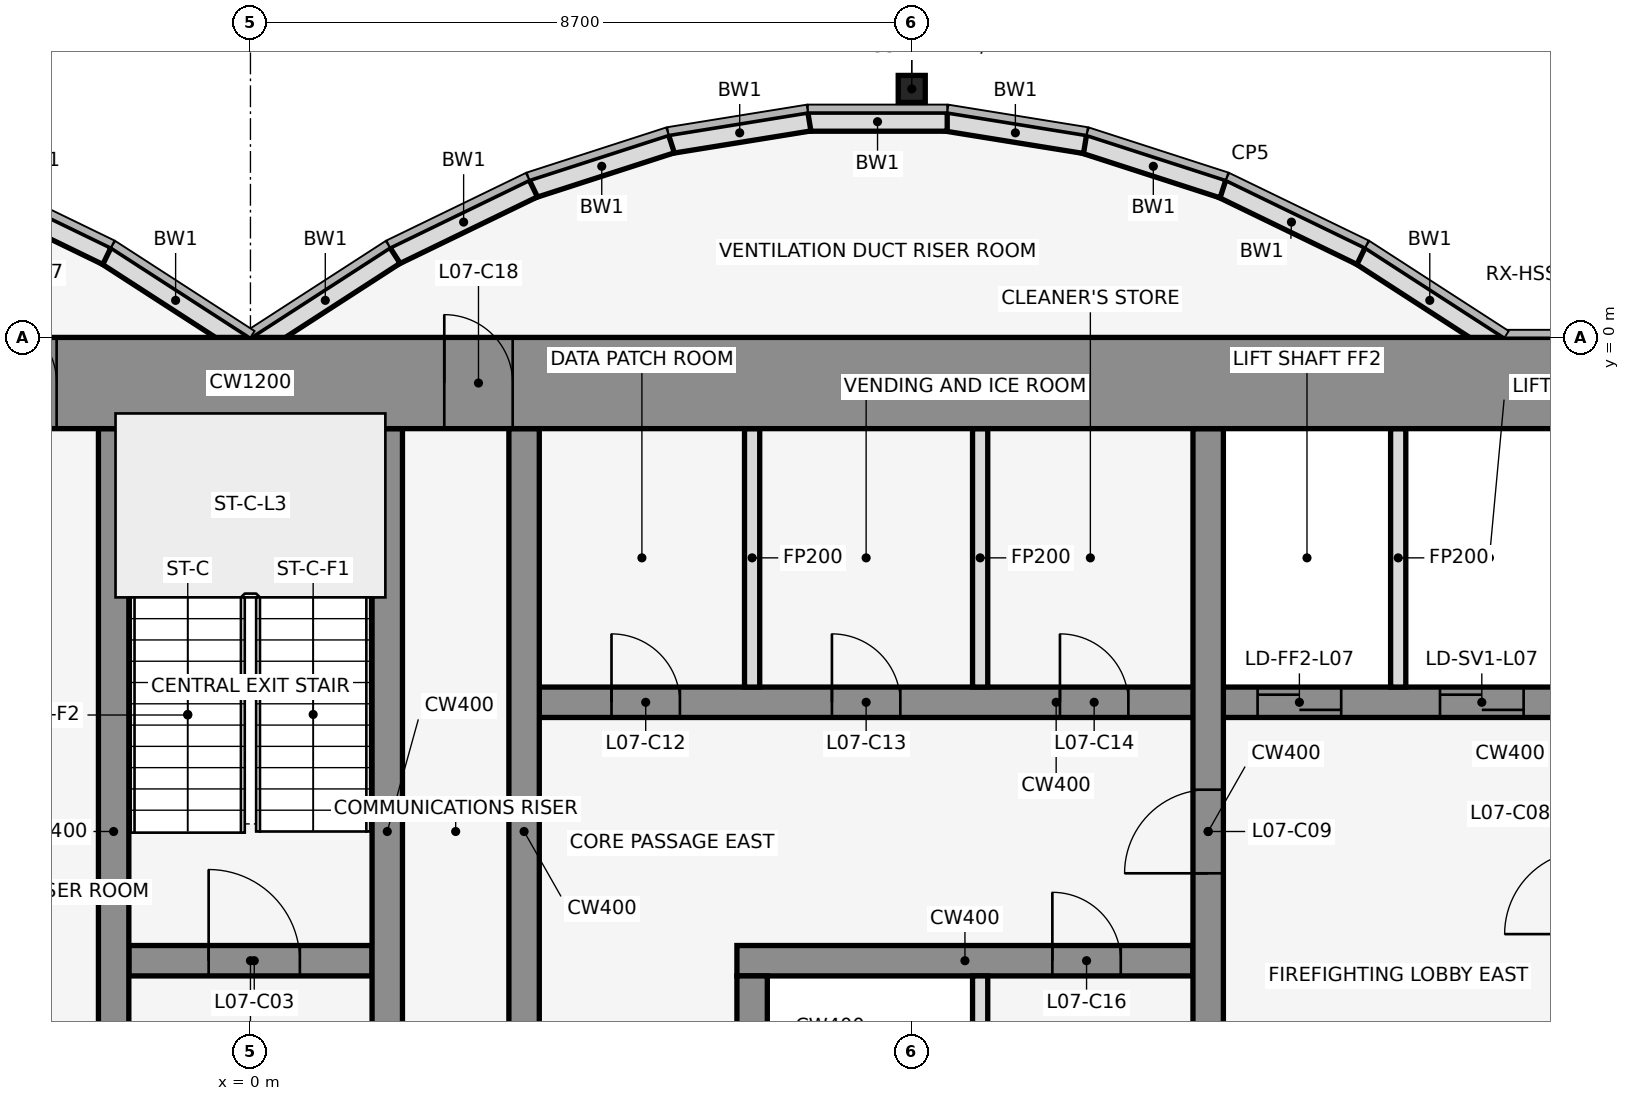
"""IFC4 building model, lengths in metres.
Left out: names, types, materials, properties, quantities, classifications, styles, units other than length and angle.
Written with IfcOpenShell. Run it as: python <this file> out.ifc"""

import sys

from ifc_helpers import new_model, si_unit, direction, frame, frame_2d, origin, origin_2d, place, context, subcontext, project, spatial, rectangle, hollow_rectangle, extrude, element, fill, save


model = new_model("IFC4")
c1 = context("Model", 3, precision=1e-05, world=origin(), true_north=direction((0.0, 1.0)))
c2 = subcontext(c1, "Body", "Model", "MODEL_VIEW")
j1 = project(units=[si_unit("LENGTHUNIT", "METRE"), si_unit("PLANEANGLEUNIT", "RADIAN")], contexts=[c1])
p1 = place(None, origin())
s1 = spatial("IfcSite", under=j1, at=p1, CompositionType="ELEMENT")
p2 = place(p1, origin())
s2 = spatial("IfcBuilding", under=s1, at=p2, CompositionType="ELEMENT")
p3 = place(p2, frame((0.0, 0.0, 39.5)))
s3 = spatial("IfcBuildingStorey", under=s2, at=p3, CompositionType="ELEMENT", Elevation=39.5)
p4 = place(p3, frame((8.7, 3.269, 0.0), z_axis=(0.0, 0.0, 1.0), x_axis=(1.0, 0.0, 0.0)))
e1 = element("IfcColumn", 1, at=p4, inside=s3, PredefinedType="COLUMN", context=c2, shape_type="SweptSolid", body=[
    extrude(hollow_rectangle(XDim=0.356, YDim=0.356, WallThickness=0.012, at=origin_2d()), origin(), (0.0, 0.0, 1.0), 4.5),
])
p5 = place(p3, frame((16.432, -0.105, 0.0), z_axis=(0.0, 0.0, 1.0), x_axis=(-0.83981312244, 0.542875602121, 0.0)))
e2 = element("IfcWall", 2, at=p5, inside=s3, PredefinedType="STANDARD", context=c2, shape_type="SweptSolid", body=[
    extrude(rectangle(XDim=2.183, YDim=0.25, at=frame_2d((1.091, 0.0))), origin(), (0.0, 0.0, 1.0), 4.35),
])
p6 = place(p3, frame((14.612, 1.073, 0.0), z_axis=(0.0, 0.0, 1.0), x_axis=(-0.89982408427, 0.436252928206, 0.0)))
e3 = element("IfcWall", 3, at=p6, inside=s3, PredefinedType="STANDARD", context=c2, shape_type="SweptSolid", body=[
    extrude(rectangle(XDim=2.038, YDim=0.25, at=frame_2d((1.019, 0.0))), origin(), (0.0, 0.0, 1.0), 4.35),
])
p7 = place(p3, frame((12.795, 1.955, 0.0), z_axis=(0.0, 0.0, 1.0), x_axis=(-0.951495806175, 0.307661714928, 0.0)))
e4 = element("IfcWall", 4, at=p7, inside=s3, PredefinedType="STANDARD", context=c2, shape_type="SweptSolid", body=[
    extrude(rectangle(XDim=1.927, YDim=0.25, at=frame_2d((0.963, 0.0))), origin(), (0.0, 0.0, 1.0), 4.35),
])
p8 = place(p3, frame((10.98, 2.543, 0.0), z_axis=(0.0, 0.0, 1.0), x_axis=(-0.987181718931, 0.159600293885, 0.0)))
e5 = element("IfcWall", 5, at=p8, inside=s3, PredefinedType="STANDARD", context=c2, shape_type="SweptSolid", body=[
    extrude(rectangle(XDim=1.857, YDim=0.25, at=frame_2d((0.929, 0.0))), origin(), (0.0, 0.0, 1.0), 4.35),
])
p9 = place(p3, frame((9.167, 2.838, 0.0), z_axis=(0.0, 0.0, 1.0), x_axis=(-1.0, 0.0, 0.0)))
e6 = element("IfcWall", 6, at=p9, inside=s3, PredefinedType="STANDARD", context=c2, shape_type="SweptSolid", body=[
    extrude(rectangle(XDim=1.833, YDim=0.25, at=frame_2d((0.917, 0.0))), origin(), (0.0, 0.0, 1.0), 4.35),
])
p10 = place(p3, frame((7.353, 2.84, 0.0), z_axis=(0.0, 0.0, 1.0), x_axis=(-0.987181718931, -0.159600293885, 0.0)))
e7 = element("IfcWall", 7, at=p10, inside=s3, PredefinedType="STANDARD", context=c2, shape_type="SweptSolid", body=[
    extrude(rectangle(XDim=1.857, YDim=0.25, at=frame_2d((0.929, 0.0))), origin(), (0.0, 0.0, 1.0), 4.35),
])
p11 = place(p3, frame((5.538, 2.548, 0.0), z_axis=(0.0, 0.0, 1.0), x_axis=(-0.951495806175, -0.307661714928, 0.0)))
e8 = element("IfcWall", 8, at=p11, inside=s3, PredefinedType="STANDARD", context=c2, shape_type="SweptSolid", body=[
    extrude(rectangle(XDim=1.927, YDim=0.25, at=frame_2d((0.963, 0.0))), origin(), (0.0, 0.0, 1.0), 4.35),
])
p12 = place(p3, frame((3.721, 1.962, 0.0), z_axis=(0.0, 0.0, 1.0), x_axis=(-0.89982408427, -0.436252928206, 0.0)))
e9 = element("IfcWall", 9, at=p12, inside=s3, PredefinedType="STANDARD", context=c2, shape_type="SweptSolid", body=[
    extrude(rectangle(XDim=2.038, YDim=0.25, at=frame_2d((1.019, 0.0))), origin(), (0.0, 0.0, 1.0), 4.35),
])
for number, where, z_axis, x_axis in (
    (10, (1.901, 1.08, 0.0), (0.0, 0.0, 1.0), (-0.84, -0.543, 0.0)),
    (11, (-0.068, -0.105, 0.0), (0.0, 0.0, 1.0), (-0.84, 0.543, 0.0)),
):
    element("IfcWall", number, at=place(p3, frame(where, z_axis=z_axis, x_axis=x_axis)), inside=s3, PredefinedType="STANDARD", context=c2, shape_type="SweptSolid", body=[
        extrude(rectangle(XDim=2.183, YDim=0.25, at=frame_2d((1.091, 0.0))), origin(), (0.0, 0.0, 1.0), 4.35),
    ])
p13 = place(p3, frame((-1.888, 1.073, 0.0), z_axis=(0.0, 0.0, 1.0), x_axis=(-0.89982408427, 0.436252928206, 0.0)))
e12 = element("IfcWall", 12, at=p13, inside=s3, PredefinedType="STANDARD", context=c2, shape_type="SweptSolid", body=[
    extrude(rectangle(XDim=2.038, YDim=0.25, at=frame_2d((1.019, 0.0))), origin(), (0.0, 0.0, 1.0), 4.35),
])
p14 = place(p3, frame((-1.6, -8.2, 0.0), z_axis=(0.0, 0.0, 1.0), x_axis=(1.0, 0.0, 0.0)))
e13 = element("IfcWall", 13, at=p14, inside=s3, PredefinedType="SHEAR", context=c2, shape_type="SweptSolid", body=[
    extrude(rectangle(XDim=3.2, YDim=0.4, at=frame_2d((1.6, 0.0))), origin(), (0.0, 0.0, 1.0), 4.5),
])
p15 = place(p14, frame((1.05, 0.0, 0.0)))
e14 = element("IfcOpeningElement", 14, at=p15, cuts=e13, PredefinedType="OPENING", context=c2, shape_type="SweptSolid", body=[
    extrude(rectangle(XDim=1.2, YDim=2.1, at=frame_2d((0.6, 1.05))), frame((0.0, 0.212, 0.0), z_axis=(0.0, -1.0, 0.0), x_axis=(1.0, 0.0, 0.0)), (0.0, 0.0, 1.0), 0.424),
])
p16 = place(p3, frame((6.4, -8.2, 0.0), z_axis=(0.0, 0.0, 1.0), x_axis=(1.0, 0.0, 0.0)))
e15 = element("IfcWall", 15, at=p16, inside=s3, PredefinedType="SHEAR", context=c2, shape_type="SweptSolid", body=[
    extrude(rectangle(XDim=6.0, YDim=0.4, at=frame_2d((3.0, 0.0))), origin(), (0.0, 0.0, 1.0), 4.5),
])
p17 = place(p16, frame((4.15, 0.0, 0.0)))
e16 = element("IfcOpeningElement", 16, at=p17, cuts=e15, PredefinedType="OPENING", context=c2, shape_type="SweptSolid", body=[
    extrude(rectangle(XDim=0.9, YDim=2.1, at=frame_2d((0.45, 1.05))), frame((0.0, 0.212, 0.0), z_axis=(0.0, -1.0, 0.0), x_axis=(1.0, 0.0, 0.0)), (0.0, 0.0, 1.0), 0.424),
])
p18 = place(p3, frame((3.8, -4.8, 0.0), z_axis=(0.0, 0.0, 1.0), x_axis=(1.0, 0.0, 0.0)))
e17 = element("IfcWall", 17, at=p18, inside=s3, PredefinedType="SHEAR", context=c2, shape_type="SweptSolid", body=[
    extrude(rectangle(XDim=13.6, YDim=0.4, at=frame_2d((6.8, 0.0))), origin(), (0.0, 0.0, 1.0), 4.5),
])
p19 = place(p18, frame((9.45, 0.0, 0.0)))
e18 = element("IfcOpeningElement", 18, at=p19, cuts=e17, PredefinedType="OPENING", context=c2, shape_type="SweptSolid", body=[
    extrude(rectangle(XDim=1.1, YDim=2.1, at=frame_2d((0.55, 1.05))), frame((0.0, 0.212, 0.0), z_axis=(0.0, -1.0, 0.0), x_axis=(1.0, 0.0, 0.0)), (0.0, 0.0, 1.0), 0.424),
])
p20 = place(p18, frame((11.85, 0.0, 0.0)))
e19 = element("IfcOpeningElement", 19, at=p20, cuts=e17, PredefinedType="OPENING", context=c2, shape_type="SweptSolid", body=[
    extrude(rectangle(XDim=1.1, YDim=2.1, at=frame_2d((0.55, 1.05))), frame((0.0, 0.212, 0.0), z_axis=(0.0, -1.0, 0.0), x_axis=(1.0, 0.0, 0.0)), (0.0, 0.0, 1.0), 0.424),
])
p21 = place(p18, frame((0.95, 0.0, 0.0)))
e20 = element("IfcOpeningElement", 20, at=p21, cuts=e17, PredefinedType="OPENING", context=c2, shape_type="SweptSolid", body=[
    extrude(rectangle(XDim=0.9, YDim=2.1, at=frame_2d((0.45, 1.05))), frame((0.0, 0.212, 0.0), z_axis=(0.0, -1.0, 0.0), x_axis=(1.0, 0.0, 0.0)), (0.0, 0.0, 1.0), 0.424),
])
p22 = place(p18, frame((3.85, 0.0, 0.0)))
e21 = element("IfcOpeningElement", 21, at=p22, cuts=e17, PredefinedType="OPENING", context=c2, shape_type="SweptSolid", body=[
    extrude(rectangle(XDim=0.9, YDim=2.1, at=frame_2d((0.45, 1.05))), frame((0.0, 0.212, 0.0), z_axis=(0.0, -1.0, 0.0), x_axis=(1.0, 0.0, 0.0)), (0.0, 0.0, 1.0), 0.424),
])
p23 = place(p18, frame((6.85, 0.0, 0.0)))
e22 = element("IfcOpeningElement", 22, at=p23, cuts=e17, PredefinedType="OPENING", context=c2, shape_type="SweptSolid", body=[
    extrude(rectangle(XDim=0.9, YDim=2.1, at=frame_2d((0.45, 1.05))), frame((0.0, 0.212, 0.0), z_axis=(0.0, -1.0, 0.0), x_axis=(1.0, 0.0, 0.0)), (0.0, 0.0, 1.0), 0.424),
])
for number, where, z_axis, x_axis in (
    (23, (-1.8, -11.8, 0.0), (0.0, 0.0, 1.0), (0.0, 1.0, 0.0)),
    (24, (1.8, -11.8, 0.0), (0.0, 0.0, 1.0), (0.0, 1.0, 0.0)),
):
    element("IfcWall", number, at=place(p3, frame(where, z_axis=z_axis, x_axis=x_axis)), inside=s3, PredefinedType="SHEAR", context=c2, shape_type="SweptSolid", body=[
        extrude(rectangle(XDim=10.6, YDim=0.4, at=frame_2d((5.3, 0.0))), origin(), (0.0, 0.0, 1.0), 4.5),
    ])
p24 = place(p3, frame((3.6, -11.8, 0.0), z_axis=(0.0, 0.0, 1.0), x_axis=(0.0, 1.0, 0.0)))
e25 = element("IfcWall", 25, at=p24, inside=s3, PredefinedType="SHEAR", context=c2, shape_type="SweptSolid", body=[
    extrude(rectangle(XDim=10.6, YDim=0.4, at=frame_2d((5.3, 0.0))), origin(), (0.0, 0.0, 1.0), 4.5),
])
p25 = place(p24, frame((1.35, 0.0, 0.0)))
e26 = element("IfcOpeningElement", 26, at=p25, cuts=e25, PredefinedType="OPENING", context=c2, shape_type="SweptSolid", body=[
    extrude(rectangle(XDim=0.9, YDim=2.1, at=frame_2d((0.45, 1.05))), frame((0.0, 0.212, 0.0), z_axis=(0.0, -1.0, 0.0), x_axis=(1.0, 0.0, 0.0)), (0.0, 0.0, 1.0), 0.424),
])
p26 = place(p3, frame((6.6, -11.8, 0.0), z_axis=(0.0, 0.0, 1.0), x_axis=(0.0, 1.0, 0.0)))
e27 = element("IfcWall", 27, at=p26, inside=s3, PredefinedType="SHEAR", context=c2, shape_type="SweptSolid", body=[
    extrude(rectangle(XDim=3.4, YDim=0.4, at=frame_2d((1.7, 0.0))), origin(), (0.0, 0.0, 1.0), 4.5),
])
for number, where, z_axis, x_axis in (
    (28, (6.6, -4.6, 0.0), (0.0, 0.0, 1.0), (0.0, 1.0, 0.0)),
    (29, (9.6, -11.8, 0.0), (0.0, 0.0, 1.0), (0.0, 1.0, 0.0)),
    (30, (9.6, -4.6, 0.0), (0.0, 0.0, 1.0), (0.0, 1.0, 0.0)),
):
    element("IfcWall", number, at=place(p3, frame(where, z_axis=z_axis, x_axis=x_axis)), inside=s3, PredefinedType="PARTITIONING", context=c2, shape_type="SweptSolid", body=[
        extrude(rectangle(XDim=3.4, YDim=0.2, at=frame_2d((1.7, 0.0))), origin(), (0.0, 0.0, 1.0), 3.418),
    ])
p27 = place(p3, frame((12.6, -11.8, 0.0), z_axis=(0.0, 0.0, 1.0), x_axis=(0.0, 1.0, 0.0)))
e31 = element("IfcWall", 31, at=p27, inside=s3, PredefinedType="SHEAR", context=c2, shape_type="SweptSolid", body=[
    extrude(rectangle(XDim=10.6, YDim=0.4, at=frame_2d((5.3, 0.0))), origin(), (0.0, 0.0, 1.0), 4.5),
])
p28 = place(p27, frame((4.75, 0.0, 0.0)))
e32 = element("IfcOpeningElement", 32, at=p28, cuts=e31, PredefinedType="OPENING", context=c2, shape_type="SweptSolid", body=[
    extrude(rectangle(XDim=1.1, YDim=2.1, at=frame_2d((0.55, 1.05))), frame((0.0, 0.212, 0.0), z_axis=(0.0, -1.0, 0.0), x_axis=(1.0, 0.0, 0.0)), (0.0, 0.0, 1.0), 0.424),
])
p29 = place(p3, frame((15.1, -4.6, 0.0), z_axis=(0.0, 0.0, 1.0), x_axis=(0.0, 1.0, 0.0)))
e33 = element("IfcWall", 33, at=p29, inside=s3, PredefinedType="PARTITIONING", context=c2, shape_type="SweptSolid", body=[
    extrude(rectangle(XDim=3.4, YDim=0.2, at=frame_2d((1.7, 0.0))), origin(), (0.0, 0.0, 1.0), 3.418),
])
p30 = place(p3, frame((-22.0, -0.6, 0.0), z_axis=(0.0, 0.0, 1.0), x_axis=(1.0, 0.0, 0.0)))
e34 = element("IfcWall", 34, at=p30, inside=s3, PredefinedType="SHEAR", context=c2, shape_type="SweptSolid", body=[
    extrude(rectangle(XDim=44.0, YDim=1.2, at=frame_2d((22.0, 0.0))), origin(), (0.0, 0.0, 1.0), 4.5),
])
p31 = place(p30, frame((18.55, 0.0, 0.0)))
e35 = element("IfcOpeningElement", 35, at=p31, cuts=e34, PredefinedType="OPENING", context=c2, shape_type="SweptSolid", body=[
    extrude(rectangle(XDim=0.9, YDim=2.1, at=frame_2d((0.45, 1.05))), frame((0.0, 0.612, 0.0), z_axis=(0.0, -1.0, 0.0), x_axis=(1.0, 0.0, 0.0)), (0.0, 0.0, 1.0), 1.224),
])
p32 = place(p30, frame((24.55, 0.0, 0.0)))
e36 = element("IfcOpeningElement", 36, at=p32, cuts=e34, PredefinedType="OPENING", context=c2, shape_type="SweptSolid", body=[
    extrude(rectangle(XDim=0.9, YDim=2.1, at=frame_2d((0.45, 1.05))), frame((0.0, 0.612, 0.0), z_axis=(0.0, -1.0, 0.0), x_axis=(1.0, 0.0, 0.0)), (0.0, 0.0, 1.0), 1.224),
])
p33 = place(p15, origin())
e37 = element("IfcDoor", 37, at=p33, inside=s3, OperationType="SINGLE_SWING_LEFT", PredefinedType="DOOR", context=c2, shape_type="SweptSolid", body=[
    extrude(rectangle(XDim=1.2, YDim=2.1, at=frame_2d((0.6, 1.05))), frame((0.0, 0.025, 0.0), z_axis=(0.0, -1.0, 0.0), x_axis=(1.0, 0.0, 0.0)), (0.0, 0.0, 1.0), 0.05),
])
fill(e14, e37)
p34 = place(p19, origin())
e38 = element("IfcDoor", 38, at=p34, inside=s3, OperationType="DOUBLE_DOOR_SLIDING", PredefinedType="DOOR", context=c2, shape_type="SweptSolid", body=[
    extrude(rectangle(XDim=1.1, YDim=2.1, at=frame_2d((0.55, 1.05))), frame((0.0, 0.025, 0.0), z_axis=(0.0, -1.0, 0.0), x_axis=(1.0, 0.0, 0.0)), (0.0, 0.0, 1.0), 0.05),
])
fill(e18, e38)
p35 = place(p20, origin())
e39 = element("IfcDoor", 39, at=p35, inside=s3, OperationType="DOUBLE_DOOR_SLIDING", PredefinedType="DOOR", context=c2, shape_type="SweptSolid", body=[
    extrude(rectangle(XDim=1.1, YDim=2.1, at=frame_2d((0.55, 1.05))), frame((0.0, 0.025, 0.0), z_axis=(0.0, -1.0, 0.0), x_axis=(1.0, 0.0, 0.0)), (0.0, 0.0, 1.0), 0.05),
])
fill(e19, e39)
p36 = place(p28, frame((1.1, 0.0, 0.0), z_axis=(0.0, 0.0, 1.0), x_axis=(-1.0, 0.0, 0.0)))
e40 = element("IfcDoor", 40, at=p36, inside=s3, OperationType="SINGLE_SWING_RIGHT", PredefinedType="DOOR", context=c2, shape_type="SweptSolid", body=[
    extrude(rectangle(XDim=1.1, YDim=2.1, at=frame_2d((0.55, 1.05))), frame((0.0, 0.025, 0.0), z_axis=(0.0, -1.0, 0.0), x_axis=(1.0, 0.0, 0.0)), (0.0, 0.0, 1.0), 0.05),
])
fill(e32, e40)
p37 = place(p21, origin())
e41 = element("IfcDoor", 41, at=p37, inside=s3, OperationType="SINGLE_SWING_RIGHT", PredefinedType="DOOR", context=c2, shape_type="SweptSolid", body=[
    extrude(rectangle(XDim=0.9, YDim=2.1, at=frame_2d((0.45, 1.05))), frame((0.0, 0.025, 0.0), z_axis=(0.0, -1.0, 0.0), x_axis=(1.0, 0.0, 0.0)), (0.0, 0.0, 1.0), 0.05),
])
fill(e20, e41)
p38 = place(p22, origin())
e42 = element("IfcDoor", 42, at=p38, inside=s3, OperationType="SINGLE_SWING_LEFT", PredefinedType="DOOR", context=c2, shape_type="SweptSolid", body=[
    extrude(rectangle(XDim=0.9, YDim=2.1, at=frame_2d((0.45, 1.05))), frame((0.0, 0.025, 0.0), z_axis=(0.0, -1.0, 0.0), x_axis=(1.0, 0.0, 0.0)), (0.0, 0.0, 1.0), 0.05),
])
fill(e21, e42)
p39 = place(p23, origin())
e43 = element("IfcDoor", 43, at=p39, inside=s3, OperationType="SINGLE_SWING_RIGHT", PredefinedType="DOOR", context=c2, shape_type="SweptSolid", body=[
    extrude(rectangle(XDim=0.9, YDim=2.1, at=frame_2d((0.45, 1.05))), frame((0.0, 0.025, 0.0), z_axis=(0.0, -1.0, 0.0), x_axis=(1.0, 0.0, 0.0)), (0.0, 0.0, 1.0), 0.05),
])
fill(e22, e43)
p40 = place(p17, frame((0.9, 0.0, 0.0), z_axis=(0.0, 0.0, 1.0), x_axis=(-1.0, 0.0, 0.0)))
e44 = element("IfcDoor", 44, at=p40, inside=s3, OperationType="SINGLE_SWING_LEFT", PredefinedType="DOOR", context=c2, shape_type="SweptSolid", body=[
    extrude(rectangle(XDim=0.9, YDim=2.1, at=frame_2d((0.45, 1.05))), frame((0.0, 0.025, 0.0), z_axis=(0.0, -1.0, 0.0), x_axis=(1.0, 0.0, 0.0)), (0.0, 0.0, 1.0), 0.05),
])
fill(e16, e44)
p41 = place(p31, origin())
e45 = element("IfcDoor", 45, at=p41, inside=s3, OperationType="SINGLE_SWING_LEFT", PredefinedType="DOOR", context=c2, shape_type="SweptSolid", body=[
    extrude(rectangle(XDim=0.9, YDim=2.1, at=frame_2d((0.45, 1.05))), frame((0.0, 0.025, 0.0), z_axis=(0.0, -1.0, 0.0), x_axis=(1.0, 0.0, 0.0)), (0.0, 0.0, 1.0), 0.05),
])
fill(e35, e45)
p42 = place(p32, origin())
e46 = element("IfcDoor", 46, at=p42, inside=s3, OperationType="SINGLE_SWING_LEFT", PredefinedType="DOOR", context=c2, shape_type="SweptSolid", body=[
    extrude(rectangle(XDim=0.9, YDim=2.1, at=frame_2d((0.45, 1.05))), frame((0.0, 0.025, 0.0), z_axis=(0.0, -1.0, 0.0), x_axis=(1.0, 0.0, 0.0)), (0.0, 0.0, 1.0), 0.05),
])
fill(e36, e46)
save(model, sys.argv[1])
